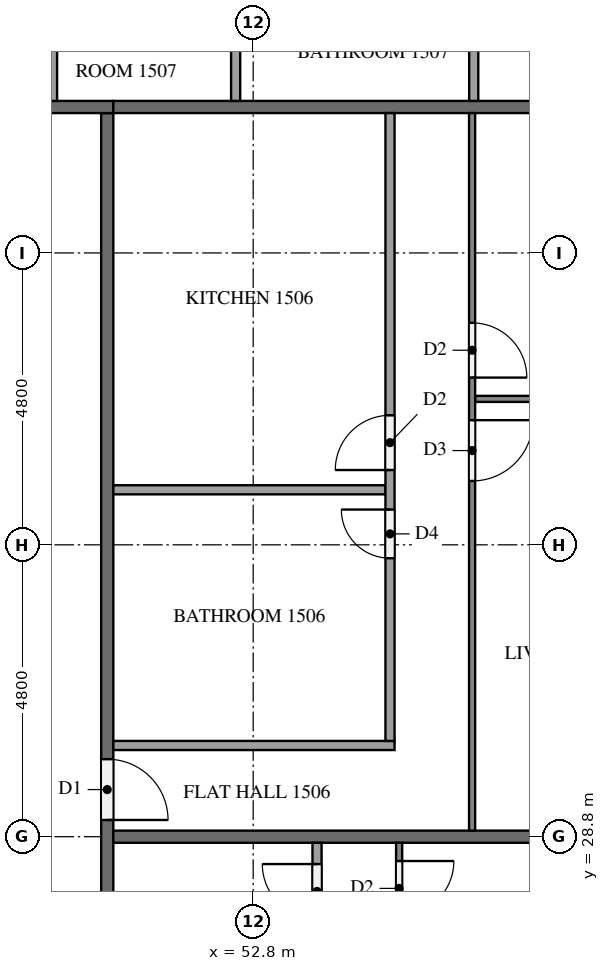
"""IFC4 building model, lengths in metres.
Left out: names, types, materials, properties, quantities, classifications, styles, units other than length and angle.
Written with IfcOpenShell. Run it as: python <this file> out.ifc"""

import sys

from ifc_helpers import new_model, si_unit, direction, frame, frame_2d, origin, place, context, subcontext, project, spatial, rectangle, extrude, element, fill, save


model = new_model("IFC4")
c1 = context("Model", 3, precision=1e-05, world=origin(), true_north=direction((0.0, 1.0)))
c2 = subcontext(c1, "Body", "Model", "MODEL_VIEW")
j1 = project(units=[si_unit("LENGTHUNIT", "METRE"), si_unit("PLANEANGLEUNIT", "RADIAN")], contexts=[c1])
p1 = place(None, origin())
s1 = spatial("IfcSite", under=j1, at=p1, CompositionType="ELEMENT")
p2 = place(p1, origin())
s2 = spatial("IfcBuilding", under=s1, at=p2, CompositionType="ELEMENT")
p3 = place(p2, frame((0.0, 0.0, 62.8)))
s3 = spatial("IfcBuildingStorey", under=s2, at=p3, CompositionType="ELEMENT", Elevation=62.8)
p4 = place(p3, frame((50.4, 40.7, 0.0), z_axis=(0.0, 0.0, 1.0), x_axis=(0.0, -1.0, 0.0)))
e1 = element("IfcWall", 1, at=p4, inside=s3, PredefinedType="PARTITIONING", context=c2, shape_type="SweptSolid", body=[
    extrude(rectangle(XDim=28.6, YDim=0.2, at=frame_2d((14.3, 0.0))), origin(), (0.0, 0.0, 1.0), 3.2),
])
p5 = place(p4, frame((24.175, 0.0, 0.0)))
e2 = element("IfcOpeningElement", 2, at=p5, cuts=e1, PredefinedType="OPENING", context=c2, shape_type="SweptSolid", body=[
    extrude(rectangle(XDim=1.0, YDim=2.1, at=frame_2d((0.5, 1.05))), frame((0.0, 0.11, 0.0), z_axis=(0.0, -1.0, 0.0), x_axis=(1.0, 0.0, 0.0)), (0.0, 0.0, 1.0), 0.22),
])
p6 = place(p4, frame((22.625, 0.0, 0.0)))
e3 = element("IfcOpeningElement", 3, at=p6, cuts=e1, PredefinedType="OPENING", context=c2, shape_type="SweptSolid", body=[
    extrude(rectangle(XDim=1.0, YDim=2.1, at=frame_2d((0.5, 1.05))), frame((0.0, 0.11, 0.0), z_axis=(0.0, -1.0, 0.0), x_axis=(1.0, 0.0, 0.0)), (0.0, 0.0, 1.0), 0.22),
])
p7 = place(p4, frame((10.625, 0.0, 0.0)))
e4 = element("IfcOpeningElement", 4, at=p7, cuts=e1, PredefinedType="OPENING", context=c2, shape_type="SweptSolid", body=[
    extrude(rectangle(XDim=1.0, YDim=2.1, at=frame_2d((0.5, 1.05))), frame((0.0, 0.11, 0.0), z_axis=(0.0, -1.0, 0.0), x_axis=(1.0, 0.0, 0.0)), (0.0, 0.0, 1.0), 0.22),
])
p8 = place(p3, frame((11.9, 40.8, 0.0), z_axis=(0.0, 0.0, 1.0), x_axis=(1.0, 0.0, 0.0)))
e5 = element("IfcWall", 5, at=p8, inside=s3, PredefinedType="PARTITIONING", context=c2, shape_type="SweptSolid", body=[
    extrude(rectangle(XDim=38.6, YDim=0.2, at=frame_2d((19.3, 0.0))), origin(), (0.0, 0.0, 1.0), 3.2),
])
p9 = place(p8, frame((36.375, 0.0, 0.0)))
e6 = element("IfcOpeningElement", 6, at=p9, cuts=e5, PredefinedType="OPENING", context=c2, shape_type="SweptSolid", body=[
    extrude(rectangle(XDim=1.0, YDim=2.1, at=frame_2d((0.5, 1.05))), frame((0.0, 0.11, 0.0), z_axis=(0.0, -1.0, 0.0), x_axis=(1.0, 0.0, 0.0)), (0.0, 0.0, 1.0), 0.22),
])
p10 = place(p8, frame((17.125, 0.0, 0.0)))
e7 = element("IfcOpeningElement", 7, at=p10, cuts=e5, PredefinedType="OPENING", context=c2, shape_type="SweptSolid", body=[
    extrude(rectangle(XDim=1.1, YDim=2.1, at=frame_2d((0.55, 1.05))), frame((0.0, 0.11, 0.0), z_axis=(0.0, -1.0, 0.0), x_axis=(1.0, 0.0, 0.0)), (0.0, 0.0, 1.0), 0.22),
])
p11 = place(p8, frame((15.625, 0.0, 0.0)))
e8 = element("IfcOpeningElement", 8, at=p11, cuts=e5, PredefinedType="OPENING", context=c2, shape_type="SweptSolid", body=[
    extrude(rectangle(XDim=1.0, YDim=2.1, at=frame_2d((0.5, 1.05))), frame((0.0, 0.11, 0.0), z_axis=(0.0, -1.0, 0.0), x_axis=(1.0, 0.0, 0.0)), (0.0, 0.0, 1.0), 0.22),
])
p12 = place(p8, frame((1.225, 0.0, 0.0)))
e9 = element("IfcOpeningElement", 9, at=p12, cuts=e5, PredefinedType="OPENING", context=c2, shape_type="SweptSolid", body=[
    extrude(rectangle(XDim=1.0, YDim=2.1, at=frame_2d((0.5, 1.05))), frame((0.0, 0.11, 0.0), z_axis=(0.0, -1.0, 0.0), x_axis=(1.0, 0.0, 0.0)), (0.0, 0.0, 1.0), 0.22),
])
for number, where, z_axis, x_axis in (
    (10, (50.5, 28.8, 0.0), (0.0, 0.0, 1.0), (1.0, 0.0, 0.0)),
    (11, (50.5, 40.8, 0.0), (0.0, 0.0, 1.0), (1.0, 0.0, 0.0)),
):
    element("IfcWall", number, at=place(p3, frame(where, z_axis=z_axis, x_axis=x_axis)), inside=s3, PredefinedType="PARTITIONING", context=c2, shape_type="SweptSolid", body=[
        extrude(rectangle(XDim=11.8, YDim=0.2, at=frame_2d((5.9, 0.0))), origin(), (0.0, 0.0, 1.0), 3.2),
    ])
p13 = place(p3, frame((55.2, 28.7, 0.0), z_axis=(0.0, 0.0, 1.0), x_axis=(0.0, -1.0, 0.0)))
e12 = element("IfcWall", 12, at=p13, inside=s3, PredefinedType="PARTITIONING", context=c2, shape_type="SweptSolid", body=[
    extrude(rectangle(XDim=11.8, YDim=0.1, at=frame_2d((5.9, 0.0))), origin(), (0.0, 0.0, 1.0), 3.2),
])
p14 = place(p13, frame((10.5, 0.0, 0.0)))
e13 = element("IfcOpeningElement", 13, at=p14, cuts=e12, PredefinedType="OPENING", context=c2, shape_type="SweptSolid", body=[
    extrude(rectangle(XDim=1.0, YDim=2.1, at=frame_2d((0.5, 1.05))), frame((0.0, 0.06, 0.0), z_axis=(0.0, -1.0, 0.0), x_axis=(1.0, 0.0, 0.0)), (0.0, 0.0, 1.0), 0.12),
])
p15 = place(p13, frame((0.3, 0.0, 0.0)))
e14 = element("IfcOpeningElement", 14, at=p15, cuts=e12, PredefinedType="OPENING", context=c2, shape_type="SweptSolid", body=[
    extrude(rectangle(XDim=0.9, YDim=2.1, at=frame_2d((0.45, 1.05))), frame((0.0, 0.06, 0.0), z_axis=(0.0, -1.0, 0.0), x_axis=(1.0, 0.0, 0.0)), (0.0, 0.0, 1.0), 0.12),
])
p16 = place(p3, frame((53.85, 18.375, 0.0), z_axis=(0.0, 0.0, 1.0), x_axis=(0.0, 1.0, 0.0)))
e15 = element("IfcWall", 15, at=p16, inside=s3, PredefinedType="PARTITIONING", context=c2, shape_type="SweptSolid", body=[
    extrude(rectangle(XDim=10.325, YDim=0.15, at=frame_2d((5.163, 0.0))), origin(), (0.0, 0.0, 1.0), 3.2),
])
p17 = place(p16, frame((0.3, 0.0, 0.0)))
e16 = element("IfcOpeningElement", 16, at=p17, cuts=e15, PredefinedType="OPENING", context=c2, shape_type="SweptSolid", body=[
    extrude(rectangle(XDim=0.8, YDim=2.1, at=frame_2d((0.4, 1.05))), frame((0.0, 0.085, 0.0), z_axis=(0.0, -1.0, 0.0), x_axis=(1.0, 0.0, 0.0)), (0.0, 0.0, 1.0), 0.17),
])
p18 = place(p16, frame((9.075, 0.0, 0.0)))
e17 = element("IfcOpeningElement", 17, at=p18, cuts=e15, PredefinedType="OPENING", context=c2, shape_type="SweptSolid", body=[
    extrude(rectangle(XDim=0.9, YDim=2.1, at=frame_2d((0.45, 1.05))), frame((0.0, 0.085, 0.0), z_axis=(0.0, -1.0, 0.0), x_axis=(1.0, 0.0, 0.0)), (0.0, 0.0, 1.0), 0.17),
])
p19 = place(p3, frame((56.45, 36.0, 0.0), z_axis=(0.0, 0.0, 1.0), x_axis=(1.0, 0.0, 0.0)))
e18 = element("IfcWall", 18, at=p19, inside=s3, PredefinedType="PARTITIONING", context=c2, shape_type="SweptSolid", body=[
    extrude(rectangle(XDim=5.85, YDim=0.1, at=frame_2d((2.925, 0.0))), origin(), (0.0, 0.0, 1.0), 3.2),
])
p20 = place(p3, frame((56.4, 40.7, 0.0), z_axis=(0.0, 0.0, 1.0), x_axis=(0.0, -1.0, 0.0)))
e19 = element("IfcWall", 19, at=p20, inside=s3, PredefinedType="PARTITIONING", context=c2, shape_type="SweptSolid", body=[
    extrude(rectangle(XDim=11.8, YDim=0.1, at=frame_2d((5.9, 0.0))), origin(), (0.0, 0.0, 1.0), 3.2),
])
p21 = place(p20, frame((5.05, 0.0, 0.0)))
e20 = element("IfcOpeningElement", 20, at=p21, cuts=e19, PredefinedType="OPENING", context=c2, shape_type="SweptSolid", body=[
    extrude(rectangle(XDim=1.0, YDim=2.1, at=frame_2d((0.5, 1.05))), frame((0.0, 0.06, 0.0), z_axis=(0.0, -1.0, 0.0), x_axis=(1.0, 0.0, 0.0)), (0.0, 0.0, 1.0), 0.12),
])
p22 = place(p20, frame((3.45, 0.0, 0.0)))
e21 = element("IfcOpeningElement", 21, at=p22, cuts=e19, PredefinedType="OPENING", context=c2, shape_type="SweptSolid", body=[
    extrude(rectangle(XDim=0.9, YDim=2.1, at=frame_2d((0.45, 1.05))), frame((0.0, 0.06, 0.0), z_axis=(0.0, -1.0, 0.0), x_axis=(1.0, 0.0, 0.0)), (0.0, 0.0, 1.0), 0.12),
])
p23 = place(p3, frame((50.5, 34.505, 0.0), z_axis=(0.0, 0.0, 1.0), x_axis=(1.0, 0.0, 0.0)))
e22 = element("IfcWall", 22, at=p23, inside=s3, PredefinedType="PARTITIONING", context=c2, shape_type="SweptSolid", body=[
    extrude(rectangle(XDim=4.475, YDim=0.15, at=frame_2d((2.238, 0.0))), origin(), (0.0, 0.0, 1.0), 3.2),
])
p24 = place(p3, frame((50.5, 30.3, 0.0), z_axis=(0.0, 0.0, 1.0), x_axis=(1.0, 0.0, 0.0)))
e23 = element("IfcWall", 23, at=p24, inside=s3, PredefinedType="PARTITIONING", context=c2, shape_type="SweptSolid", body=[
    extrude(rectangle(XDim=4.625, YDim=0.15, at=frame_2d((2.312, 0.0))), origin(), (0.0, 0.0, 1.0), 3.2),
])
p25 = place(p3, frame((55.05, 30.375, 0.0), z_axis=(0.0, 0.0, 1.0), x_axis=(0.0, 1.0, 0.0)))
e24 = element("IfcWall", 24, at=p25, inside=s3, PredefinedType="PARTITIONING", context=c2, shape_type="SweptSolid", body=[
    extrude(rectangle(XDim=10.325, YDim=0.15, at=frame_2d((5.163, 0.0))), origin(), (0.0, 0.0, 1.0), 3.2),
])
p26 = place(p25, frame((3.005, 0.0, 0.0)))
e25 = element("IfcOpeningElement", 25, at=p26, cuts=e24, PredefinedType="OPENING", context=c2, shape_type="SweptSolid", body=[
    extrude(rectangle(XDim=0.8, YDim=2.1, at=frame_2d((0.4, 1.05))), frame((0.0, 0.085, 0.0), z_axis=(0.0, -1.0, 0.0), x_axis=(1.0, 0.0, 0.0)), (0.0, 0.0, 1.0), 0.17),
])
p27 = place(p25, frame((4.455, 0.0, 0.0)))
e26 = element("IfcOpeningElement", 26, at=p27, cuts=e24, PredefinedType="OPENING", context=c2, shape_type="SweptSolid", body=[
    extrude(rectangle(XDim=0.9, YDim=2.1, at=frame_2d((0.45, 1.05))), frame((0.0, 0.085, 0.0), z_axis=(0.0, -1.0, 0.0), x_axis=(1.0, 0.0, 0.0)), (0.0, 0.0, 1.0), 0.17),
])
for number, where, z_axis, x_axis in (
    (27, (52.511, 40.9, 0.0), (0.0, 0.0, 1.0), (0.0, 1.0, 0.0)),
    (28, (56.427, 40.9, 0.0), (0.0, 0.0, 1.0), (0.0, 1.0, 0.0)),
):
    element("IfcWall", number, at=place(p3, frame(where, z_axis=z_axis, x_axis=x_axis)), inside=s3, PredefinedType="PARTITIONING", context=c2, shape_type="SweptSolid", body=[
        extrude(rectangle(XDim=1.775, YDim=0.15, at=frame_2d((0.888, 0.0))), origin(), (0.0, 0.0, 1.0), 3.2),
    ])
p28 = place(p3, frame((49.5, 40.9, 0.0), z_axis=(0.0, 0.0, 1.0), x_axis=(0.0, 1.0, 0.0)))
e29 = element("IfcWall", 29, at=p28, inside=s3, PredefinedType="PARTITIONING", context=c2, shape_type="SweptSolid", body=[
    extrude(rectangle(XDim=1.925, YDim=0.15, at=frame_2d((0.962, 0.0))), origin(), (0.0, 0.0, 1.0), 3.2),
])
p29 = place(p7, origin())
e30 = element("IfcDoor", 30, at=p29, inside=s3, OperationType="SINGLE_SWING_RIGHT", PredefinedType="DOOR", context=c2, shape_type="SweptSolid", body=[
    extrude(rectangle(XDim=1.0, YDim=2.1, at=frame_2d((0.5, 1.05))), frame((0.0, 0.025, 0.0), z_axis=(0.0, -1.0, 0.0), x_axis=(1.0, 0.0, 0.0)), (0.0, 0.0, 1.0), 0.05),
])
fill(e4, e30)
p30 = place(p15, origin())
e31 = element("IfcDoor", 31, at=p30, inside=s3, OperationType="SINGLE_SWING_LEFT", PredefinedType="DOOR", context=c2, shape_type="SweptSolid", body=[
    extrude(rectangle(XDim=0.9, YDim=2.1, at=frame_2d((0.45, 1.05))), frame((0.0, 0.025, 0.0), z_axis=(0.0, -1.0, 0.0), x_axis=(1.0, 0.0, 0.0)), (0.0, 0.0, 1.0), 0.05),
])
fill(e14, e31)
p31 = place(p18, origin())
e32 = element("IfcDoor", 32, at=p31, inside=s3, OperationType="SINGLE_SWING_RIGHT", PredefinedType="DOOR", context=c2, shape_type="SweptSolid", body=[
    extrude(rectangle(XDim=0.9, YDim=2.1, at=frame_2d((0.45, 1.05))), frame((0.0, 0.025, 0.0), z_axis=(0.0, -1.0, 0.0), x_axis=(1.0, 0.0, 0.0)), (0.0, 0.0, 1.0), 0.05),
])
fill(e17, e32)
p32 = place(p21, origin())
e33 = element("IfcDoor", 33, at=p32, inside=s3, OperationType="SINGLE_SWING_LEFT", PredefinedType="DOOR", context=c2, shape_type="SweptSolid", body=[
    extrude(rectangle(XDim=1.0, YDim=2.1, at=frame_2d((0.5, 1.05))), frame((0.0, 0.025, 0.0), z_axis=(0.0, -1.0, 0.0), x_axis=(1.0, 0.0, 0.0)), (0.0, 0.0, 1.0), 0.05),
])
fill(e20, e33)
p33 = place(p22, origin())
e34 = element("IfcDoor", 34, at=p33, inside=s3, OperationType="SINGLE_SWING_RIGHT", PredefinedType="DOOR", context=c2, shape_type="SweptSolid", body=[
    extrude(rectangle(XDim=0.9, YDim=2.1, at=frame_2d((0.45, 1.05))), frame((0.0, 0.025, 0.0), z_axis=(0.0, -1.0, 0.0), x_axis=(1.0, 0.0, 0.0)), (0.0, 0.0, 1.0), 0.05),
])
fill(e21, e34)
p34 = place(p26, origin())
e35 = element("IfcDoor", 35, at=p34, inside=s3, OperationType="SINGLE_SWING_RIGHT", PredefinedType="DOOR", context=c2, shape_type="SweptSolid", body=[
    extrude(rectangle(XDim=0.8, YDim=2.1, at=frame_2d((0.4, 1.05))), frame((0.0, 0.025, 0.0), z_axis=(0.0, -1.0, 0.0), x_axis=(1.0, 0.0, 0.0)), (0.0, 0.0, 1.0), 0.05),
])
fill(e25, e35)
p35 = place(p27, origin())
e36 = element("IfcDoor", 36, at=p35, inside=s3, OperationType="SINGLE_SWING_LEFT", PredefinedType="DOOR", context=c2, shape_type="SweptSolid", body=[
    extrude(rectangle(XDim=0.9, YDim=2.1, at=frame_2d((0.45, 1.05))), frame((0.0, 0.025, 0.0), z_axis=(0.0, -1.0, 0.0), x_axis=(1.0, 0.0, 0.0)), (0.0, 0.0, 1.0), 0.05),
])
fill(e26, e36)
save(model, sys.argv[1])
